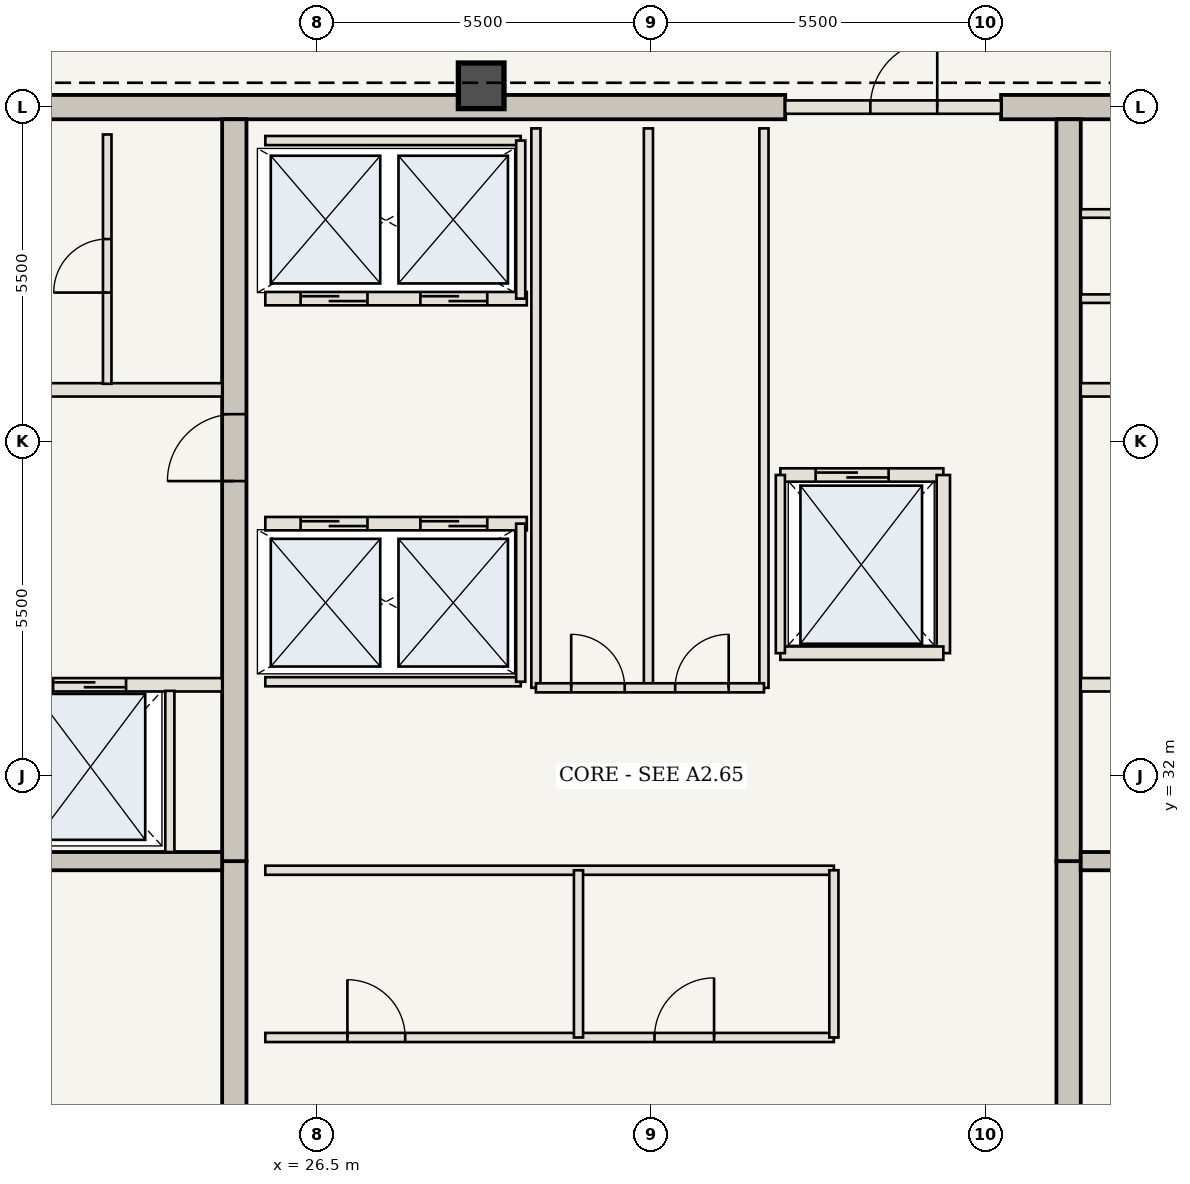
"""IFC4 building model, lengths in metres.
Left out: names, types, materials, properties, quantities, classifications, styles, units other than length and angle.
Written with IfcOpenShell. Run it as: python <this file> out.ifc"""

import sys

from ifc_helpers import new_model, si_unit, direction, frame, frame_2d, origin, origin_2d, place, context, subcontext, project, spatial, rectangle, extrude, element, fill, save


model = new_model("IFC4")
c1 = context("Model", 3, precision=1e-05, world=origin(), true_north=direction((0.0, 1.0)))
c2 = subcontext(c1, "Body", "Model", "MODEL_VIEW")
j1 = project(units=[si_unit("LENGTHUNIT", "METRE"), si_unit("PLANEANGLEUNIT", "RADIAN")], contexts=[c1])
p1 = place(None, origin())
s1 = spatial("IfcSite", under=j1, at=p1, CompositionType="ELEMENT")
p2 = place(p1, origin())
s2 = spatial("IfcBuilding", under=s1, at=p2, CompositionType="ELEMENT")
p3 = place(p2, frame((0.0, 0.0, 300.65)))
s3 = spatial("IfcBuildingStorey", under=s2, at=p3, CompositionType="ELEMENT", Elevation=300.65)
p4 = place(p3, frame((21.41, 43.0, 0.0), z_axis=(0.0, 0.0, 1.0), x_axis=(1.0, 0.0, 0.0)))
e1 = element("IfcWall", 1, at=p4, inside=s3, PredefinedType="SHEAR", context=c2, shape_type="SweptSolid", body=[
    extrude(rectangle(XDim=12.79, YDim=0.4, at=frame_2d((6.395, 0.0))), origin(), (0.0, 0.0, 1.0), 3.85),
])
p5 = place(p3, frame((37.75, 43.0, 0.0), z_axis=(0.0, 0.0, 1.0), x_axis=(1.0, 0.0, 0.0)))
e2 = element("IfcWall", 2, at=p5, inside=s3, PredefinedType="SHEAR", context=c2, shape_type="SweptSolid", body=[
    extrude(rectangle(XDim=4.84, YDim=0.4, at=frame_2d((2.42, 0.0))), origin(), (0.0, 0.0, 1.0), 3.85),
])
p6 = place(p3, frame((25.14, 21.15, 0.0), z_axis=(0.0, 0.0, 1.0), x_axis=(0.0, 1.0, 0.0)))
e3 = element("IfcWall", 3, at=p6, inside=s3, PredefinedType="SHEAR", context=c2, shape_type="SweptSolid", body=[
    extrude(rectangle(XDim=9.45, YDim=0.4, at=frame_2d((4.725, 0.0))), origin(), (0.0, 0.0, 1.0), 3.85),
])
p7 = place(p3, frame((25.14, 30.6, 0.0), z_axis=(0.0, 0.0, 1.0), x_axis=(0.0, 1.0, 0.0)))
e4 = element("IfcWall", 4, at=p7, inside=s3, PredefinedType="SHEAR", context=c2, shape_type="SweptSolid", body=[
    extrude(rectangle(XDim=12.2, YDim=0.4, at=frame_2d((6.1, 0.0))), origin(), (0.0, 0.0, 1.0), 3.85),
])
p8 = place(p7, frame((6.25, 0.0, 0.0)))
e5 = element("IfcOpeningElement", 5, at=p8, cuts=e4, PredefinedType="OPENING", context=c2, shape_type="SweptSolid", body=[
    extrude(rectangle(XDim=1.1, YDim=2.15, at=frame_2d((0.55, 1.075))), frame((0.0, 0.21, 0.0), z_axis=(0.0, -1.0, 0.0), x_axis=(1.0, 0.0, 0.0)), (0.0, 0.0, 1.0), 0.42),
])
p9 = place(p3, frame((38.86, 21.15, 0.0), z_axis=(0.0, 0.0, 1.0), x_axis=(0.0, 1.0, 0.0)))
e6 = element("IfcWall", 6, at=p9, inside=s3, PredefinedType="SHEAR", context=c2, shape_type="SweptSolid", body=[
    extrude(rectangle(XDim=9.45, YDim=0.4, at=frame_2d((4.725, 0.0))), origin(), (0.0, 0.0, 1.0), 3.85),
])
p10 = place(p3, frame((38.86, 30.6, 0.0), z_axis=(0.0, 0.0, 1.0), x_axis=(0.0, 1.0, 0.0)))
e7 = element("IfcWall", 7, at=p10, inside=s3, PredefinedType="SHEAR", context=c2, shape_type="SweptSolid", body=[
    extrude(rectangle(XDim=12.2, YDim=0.4, at=frame_2d((6.1, 0.0))), origin(), (0.0, 0.0, 1.0), 3.85),
])
p11 = place(p3, frame((29.2, 43.35, 0.0), z_axis=(0.0, 0.0, 1.0), x_axis=(1.0, 0.0, 0.0)))
e8 = element("IfcColumn", 8, at=p11, inside=s3, PredefinedType="COLUMN", context=c2, shape_type="SweptSolid", body=[
    extrude(rectangle(XDim=0.75, YDim=0.75, at=origin_2d()), origin(), (0.0, 0.0, 1.0), 3.85),
])
for number, where, z_axis, x_axis in (
    (9, (21.41, 30.6, 0.0), (0.0, 0.0, 1.0), (1.0, 0.0, 0.0)),
    (10, (39.06, 30.6, 0.0), (0.0, 0.0, 1.0), (1.0, 0.0, 0.0)),
):
    element("IfcWall", number, at=place(p3, frame(where, z_axis=z_axis, x_axis=x_axis)), inside=s3, PredefinedType="SHEAR", context=c2, shape_type="SweptSolid", body=[
        extrude(rectangle(XDim=3.53, YDim=0.3, at=frame_2d((1.765, 0.0))), origin(), (0.0, 0.0, 1.0), 3.685),
    ])
p12 = place(p3, frame((21.41, 33.5, 0.0), z_axis=(0.0, 0.0, 1.0), x_axis=(1.0, 0.0, 0.0)))
e11 = element("IfcWall", 11, at=p12, inside=s3, PredefinedType="STANDARD", context=c2, shape_type="SweptSolid", body=[
    extrude(rectangle(XDim=3.53, YDim=0.22, at=frame_2d((1.765, 0.0))), origin(), (0.0, 0.0, 1.0), 3.685),
])
p13 = place(p12, frame((0.75, 0.0, 0.0)))
e12 = element("IfcOpeningElement", 12, at=p13, cuts=e11, PredefinedType="OPENING", context=c2, shape_type="SweptSolid", body=[
    extrude(rectangle(XDim=1.2, YDim=2.2, at=frame_2d((0.6, 1.1))), frame((0.0, 0.12, 0.0), z_axis=(0.0, -1.0, 0.0), x_axis=(1.0, 0.0, 0.0)), (0.0, 0.0, 1.0), 0.24),
])
p14 = place(p3, frame((24.08, 30.75, 0.0), z_axis=(0.0, 0.0, 1.0), x_axis=(0.0, 1.0, 0.0)))
e13 = element("IfcWall", 13, at=p14, inside=s3, PredefinedType="STANDARD", context=c2, shape_type="SweptSolid", body=[
    extrude(rectangle(XDim=2.65, YDim=0.15, at=frame_2d((1.325, 0.0))), origin(), (0.0, 0.0, 1.0), 3.685),
])
p15 = place(p3, frame((39.06, 33.5, 0.0), z_axis=(0.0, 0.0, 1.0), x_axis=(1.0, 0.0, 0.0)))
e14 = element("IfcWall", 14, at=p15, inside=s3, PredefinedType="STANDARD", context=c2, shape_type="SweptSolid", body=[
    extrude(rectangle(XDim=3.53, YDim=0.22, at=frame_2d((1.765, 0.0))), origin(), (0.0, 0.0, 1.0), 3.685),
])
p16 = place(p15, frame((1.55, 0.0, 0.0)))
e15 = element("IfcOpeningElement", 15, at=p16, cuts=e14, PredefinedType="OPENING", context=c2, shape_type="SweptSolid", body=[
    extrude(rectangle(XDim=1.2, YDim=2.2, at=frame_2d((0.6, 1.1))), frame((0.0, 0.12, 0.0), z_axis=(0.0, -1.0, 0.0), x_axis=(1.0, 0.0, 0.0)), (0.0, 0.0, 1.0), 0.24),
])
for number, where, z_axis, x_axis in (
    (16, (21.41, 38.35, 0.0), (0.0, 0.0, 1.0), (1.0, 0.0, 0.0)),
    (17, (39.06, 38.35, 0.0), (0.0, 0.0, 1.0), (1.0, 0.0, 0.0)),
):
    element("IfcWall", number, at=place(p3, frame(where, z_axis=z_axis, x_axis=x_axis)), inside=s3, PredefinedType="STANDARD", context=c2, shape_type="SweptSolid", body=[
        extrude(rectangle(XDim=3.53, YDim=0.22, at=frame_2d((1.765, 0.0))), origin(), (0.0, 0.0, 1.0), 3.685),
    ])
p17 = place(p3, frame((23.05, 38.45, 0.0), z_axis=(0.0, 0.0, 1.0), x_axis=(0.0, 1.0, 0.0)))
e18 = element("IfcWall", 18, at=p17, inside=s3, PredefinedType="STANDARD", context=c2, shape_type="SweptSolid", body=[
    extrude(rectangle(XDim=4.1, YDim=0.14, at=frame_2d((2.05, 0.0))), origin(), (0.0, 0.0, 1.0), 3.685),
])
p18 = place(p17, frame((1.5, 0.0, 0.0)))
e19 = element("IfcOpeningElement", 19, at=p18, cuts=e18, PredefinedType="OPENING", context=c2, shape_type="SweptSolid", body=[
    extrude(rectangle(XDim=0.88, YDim=2.1, at=frame_2d((0.44, 1.05))), frame((0.0, 0.08, 0.0), z_axis=(0.0, -1.0, 0.0), x_axis=(1.0, 0.0, 0.0)), (0.0, 0.0, 1.0), 0.16),
])
for number, where, z_axis, x_axis in (
    (20, (39.06, 39.85, 0.0), (0.0, 0.0, 1.0), (1.0, 0.0, 0.0)),
    (21, (39.06, 41.25, 0.0), (0.0, 0.0, 1.0), (1.0, 0.0, 0.0)),
):
    element("IfcWall", number, at=place(p3, frame(where, z_axis=z_axis, x_axis=x_axis)), inside=s3, PredefinedType="STANDARD", context=c2, shape_type="SweptSolid", body=[
        extrude(rectangle(XDim=3.53, YDim=0.14, at=frame_2d((1.765, 0.0))), origin(), (0.0, 0.0, 1.0), 3.685),
    ])
p19 = place(p3, frame((25.65, 27.7, 0.0), z_axis=(0.0, 0.0, 1.0), x_axis=(1.0, 0.0, 0.0)))
e22 = element("IfcWall", 22, at=p19, inside=s3, PredefinedType="STANDARD", context=c2, shape_type="SweptSolid", body=[
    extrude(rectangle(XDim=9.35, YDim=0.15, at=frame_2d((4.675, 0.0))), origin(), (0.0, 0.0, 1.0), 3.685),
])
p20 = place(p19, frame((1.35, 0.0, 0.0)))
e23 = element("IfcOpeningElement", 23, at=p20, cuts=e22, PredefinedType="OPENING", context=c2, shape_type="SweptSolid", body=[
    extrude(rectangle(XDim=0.95, YDim=2.15, at=frame_2d((0.475, 1.075))), frame((0.0, 0.085, 0.0), z_axis=(0.0, -1.0, 0.0), x_axis=(1.0, 0.0, 0.0)), (0.0, 0.0, 1.0), 0.17),
])
p21 = place(p19, frame((6.4, 0.0, 0.0)))
e24 = element("IfcOpeningElement", 24, at=p21, cuts=e22, PredefinedType="OPENING", context=c2, shape_type="SweptSolid", body=[
    extrude(rectangle(XDim=0.98, YDim=2.2, at=frame_2d((0.49, 1.1))), frame((0.0, 0.085, 0.0), z_axis=(0.0, -1.0, 0.0), x_axis=(1.0, 0.0, 0.0)), (0.0, 0.0, 1.0), 0.17),
])
p22 = place(p3, frame((25.65, 30.45, 0.0), z_axis=(0.0, 0.0, 1.0), x_axis=(1.0, 0.0, 0.0)))
e25 = element("IfcWall", 25, at=p22, inside=s3, PredefinedType="STANDARD", context=c2, shape_type="SweptSolid", body=[
    extrude(rectangle(XDim=9.35, YDim=0.15, at=frame_2d((4.675, 0.0))), origin(), (0.0, 0.0, 1.0), 3.685),
])
for number, where, z_axis, x_axis in (
    (26, (30.8, 27.7, 0.0), (0.0, 0.0, 1.0), (0.0, 1.0, 0.0)),
    (27, (35.0, 27.7, 0.0), (0.0, 0.0, 1.0), (0.0, 1.0, 0.0)),
):
    element("IfcWall", number, at=place(p3, frame(where, z_axis=z_axis, x_axis=x_axis)), inside=s3, PredefinedType="STANDARD", context=c2, shape_type="SweptSolid", body=[
        extrude(rectangle(XDim=2.75, YDim=0.15, at=frame_2d((1.375, 0.0))), origin(), (0.0, 0.0, 1.0), 3.685),
    ])
p23 = place(p3, frame((25.65, 36.15, 0.0), z_axis=(0.0, 0.0, 1.0), x_axis=(1.0, 0.0, 0.0)))
e28 = element("IfcWall", 28, at=p23, inside=s3, PredefinedType="STANDARD", context=c2, shape_type="SweptSolid", body=[
    extrude(rectangle(XDim=4.3, YDim=0.22, at=frame_2d((2.15, 0.0))), origin(), (0.0, 0.0, 1.0), 3.685),
])
p24 = place(p23, frame((0.58, 0.0, 0.0)))
e29 = element("IfcOpeningElement", 29, at=p24, cuts=e28, PredefinedType="OPENING", context=c2, shape_type="SweptSolid", body=[
    extrude(rectangle(XDim=1.1, YDim=2.15, at=frame_2d((0.55, 1.075))), frame((0.0, 0.12, 0.0), z_axis=(0.0, -1.0, 0.0), x_axis=(1.0, 0.0, 0.0)), (0.0, 0.0, 1.0), 0.24),
])
p25 = place(p23, frame((2.55, 0.0, 0.0)))
e30 = element("IfcOpeningElement", 30, at=p25, cuts=e28, PredefinedType="OPENING", context=c2, shape_type="SweptSolid", body=[
    extrude(rectangle(XDim=1.1, YDim=2.15, at=frame_2d((0.55, 1.075))), frame((0.0, 0.12, 0.0), z_axis=(0.0, -1.0, 0.0), x_axis=(1.0, 0.0, 0.0)), (0.0, 0.0, 1.0), 0.24),
])
p26 = place(p3, frame((25.65, 33.55, 0.0), z_axis=(0.0, 0.0, 1.0), x_axis=(1.0, 0.0, 0.0)))
e31 = element("IfcWall", 31, at=p26, inside=s3, PredefinedType="STANDARD", context=c2, shape_type="SweptSolid", body=[
    extrude(rectangle(XDim=4.2, YDim=0.15, at=frame_2d((2.1, 0.0))), origin(), (0.0, 0.0, 1.0), 3.685),
])
p27 = place(p3, frame((29.85, 33.55, 0.0), z_axis=(0.0, 0.0, 1.0), x_axis=(0.0, 1.0, 0.0)))
e32 = element("IfcWall", 32, at=p27, inside=s3, PredefinedType="STANDARD", context=c2, shape_type="SweptSolid", body=[
    extrude(rectangle(XDim=2.6, YDim=0.15, at=frame_2d((1.3, 0.0))), origin(), (0.0, 0.0, 1.0), 3.685),
])
p28 = place(p3, frame((25.65, 39.85, 0.0), z_axis=(0.0, 0.0, 1.0), x_axis=(1.0, 0.0, 0.0)))
e33 = element("IfcWall", 33, at=p28, inside=s3, PredefinedType="STANDARD", context=c2, shape_type="SweptSolid", body=[
    extrude(rectangle(XDim=4.3, YDim=0.22, at=frame_2d((2.15, 0.0))), origin(), (0.0, 0.0, 1.0), 3.685),
])
p29 = place(p28, frame((0.58, 0.0, 0.0)))
e34 = element("IfcOpeningElement", 34, at=p29, cuts=e33, PredefinedType="OPENING", context=c2, shape_type="SweptSolid", body=[
    extrude(rectangle(XDim=1.1, YDim=2.15, at=frame_2d((0.55, 1.075))), frame((0.0, 0.12, 0.0), z_axis=(0.0, -1.0, 0.0), x_axis=(1.0, 0.0, 0.0)), (0.0, 0.0, 1.0), 0.24),
])
p30 = place(p28, frame((2.55, 0.0, 0.0)))
e35 = element("IfcOpeningElement", 35, at=p30, cuts=e33, PredefinedType="OPENING", context=c2, shape_type="SweptSolid", body=[
    extrude(rectangle(XDim=1.1, YDim=2.15, at=frame_2d((0.55, 1.075))), frame((0.0, 0.12, 0.0), z_axis=(0.0, -1.0, 0.0), x_axis=(1.0, 0.0, 0.0)), (0.0, 0.0, 1.0), 0.24),
])
p31 = place(p3, frame((25.65, 42.45, 0.0), z_axis=(0.0, 0.0, 1.0), x_axis=(1.0, 0.0, 0.0)))
e36 = element("IfcWall", 36, at=p31, inside=s3, PredefinedType="STANDARD", context=c2, shape_type="SweptSolid", body=[
    extrude(rectangle(XDim=4.2, YDim=0.15, at=frame_2d((2.1, 0.0))), origin(), (0.0, 0.0, 1.0), 3.685),
])
p32 = place(p3, frame((29.85, 39.85, 0.0), z_axis=(0.0, 0.0, 1.0), x_axis=(0.0, 1.0, 0.0)))
e37 = element("IfcWall", 37, at=p32, inside=s3, PredefinedType="STANDARD", context=c2, shape_type="SweptSolid", body=[
    extrude(rectangle(XDim=2.6, YDim=0.15, at=frame_2d((1.3, 0.0))), origin(), (0.0, 0.0, 1.0), 3.685),
])
for number, where, z_axis, x_axis in (
    (38, (30.1, 33.45, 0.0), (0.0, 0.0, 1.0), (0.0, 1.0, 0.0)),
    (39, (31.95, 33.45, 0.0), (0.0, 0.0, 1.0), (0.0, 1.0, 0.0)),
    (40, (33.85, 33.45, 0.0), (0.0, 0.0, 1.0), (0.0, 1.0, 0.0)),
):
    element("IfcWall", number, at=place(p3, frame(where, z_axis=z_axis, x_axis=x_axis)), inside=s3, PredefinedType="STANDARD", context=c2, shape_type="SweptSolid", body=[
        extrude(rectangle(XDim=9.2, YDim=0.15, at=frame_2d((4.6, 0.0))), origin(), (0.0, 0.0, 1.0), 3.685),
    ])
p33 = place(p3, frame((30.1, 33.45, 0.0), z_axis=(0.0, 0.0, 1.0), x_axis=(1.0, 0.0, 0.0)))
e41 = element("IfcWall", 41, at=p33, inside=s3, PredefinedType="STANDARD", context=c2, shape_type="SweptSolid", body=[
    extrude(rectangle(XDim=3.75, YDim=0.15, at=frame_2d((1.875, 0.0))), origin(), (0.0, 0.0, 1.0), 3.685),
])
p34 = place(p33, frame((0.58, 0.0, 0.0)))
e42 = element("IfcOpeningElement", 42, at=p34, cuts=e41, PredefinedType="OPENING", context=c2, shape_type="SweptSolid", body=[
    extrude(rectangle(XDim=0.88, YDim=2.1, at=frame_2d((0.44, 1.05))), frame((0.0, 0.085, 0.0), z_axis=(0.0, -1.0, 0.0), x_axis=(1.0, 0.0, 0.0)), (0.0, 0.0, 1.0), 0.17),
])
p35 = place(p33, frame((2.29, 0.0, 0.0)))
e43 = element("IfcOpeningElement", 43, at=p35, cuts=e41, PredefinedType="OPENING", context=c2, shape_type="SweptSolid", body=[
    extrude(rectangle(XDim=0.88, YDim=2.1, at=frame_2d((0.44, 1.05))), frame((0.0, 0.085, 0.0), z_axis=(0.0, -1.0, 0.0), x_axis=(1.0, 0.0, 0.0)), (0.0, 0.0, 1.0), 0.17),
])
p36 = place(p3, frame((34.2, 43.0, 0.0), z_axis=(0.0, 0.0, 1.0), x_axis=(1.0, 0.0, 0.0)))
e44 = element("IfcWall", 44, at=p36, inside=s3, PredefinedType="STANDARD", context=c2, shape_type="SweptSolid", body=[
    extrude(rectangle(XDim=3.55, YDim=0.22, at=frame_2d((1.775, 0.0))), origin(), (0.0, 0.0, 1.0), 3.685),
])
p37 = place(p36, frame((1.4, 0.0, 0.0)))
e45 = element("IfcOpeningElement", 45, at=p37, cuts=e44, PredefinedType="OPENING", context=c2, shape_type="SweptSolid", body=[
    extrude(rectangle(XDim=1.1, YDim=2.15, at=frame_2d((0.55, 1.075))), frame((0.0, 0.12, 0.0), z_axis=(0.0, -1.0, 0.0), x_axis=(1.0, 0.0, 0.0)), (0.0, 0.0, 1.0), 0.24),
])
p38 = place(p3, frame((34.12, 36.95, 0.0), z_axis=(0.0, 0.0, 1.0), x_axis=(1.0, 0.0, 0.0)))
e46 = element("IfcWall", 46, at=p38, inside=s3, PredefinedType="STANDARD", context=c2, shape_type="SweptSolid", body=[
    extrude(rectangle(XDim=2.68, YDim=0.22, at=frame_2d((1.34, 0.0))), origin(), (0.0, 0.0, 1.0), 3.685),
])
p39 = place(p38, frame((0.58, 0.0, 0.0)))
e47 = element("IfcOpeningElement", 47, at=p39, cuts=e46, PredefinedType="OPENING", context=c2, shape_type="SweptSolid", body=[
    extrude(rectangle(XDim=1.2, YDim=2.2, at=frame_2d((0.6, 1.1))), frame((0.0, 0.12, 0.0), z_axis=(0.0, -1.0, 0.0), x_axis=(1.0, 0.0, 0.0)), (0.0, 0.0, 1.0), 0.24),
])
p40 = place(p3, frame((36.8, 34.02, 0.0), z_axis=(0.0, 0.0, 1.0), x_axis=(0.0, 1.0, 0.0)))
e48 = element("IfcWall", 48, at=p40, inside=s3, PredefinedType="STANDARD", context=c2, shape_type="SweptSolid", body=[
    extrude(rectangle(XDim=2.93, YDim=0.22, at=frame_2d((1.465, 0.0))), origin(), (0.0, 0.0, 1.0), 3.685),
])
p41 = place(p3, frame((34.12, 34.02, 0.0), z_axis=(0.0, 0.0, 1.0), x_axis=(1.0, 0.0, 0.0)))
e49 = element("IfcWall", 49, at=p41, inside=s3, PredefinedType="STANDARD", context=c2, shape_type="SweptSolid", body=[
    extrude(rectangle(XDim=2.68, YDim=0.22, at=frame_2d((1.34, 0.0))), origin(), (0.0, 0.0, 1.0), 3.685),
])
p42 = place(p3, frame((34.12, 34.02, 0.0), z_axis=(0.0, 0.0, 1.0), x_axis=(0.0, 1.0, 0.0)))
e50 = element("IfcWall", 50, at=p42, inside=s3, PredefinedType="STANDARD", context=c2, shape_type="SweptSolid", body=[
    extrude(rectangle(XDim=2.93, YDim=0.15, at=frame_2d((1.465, 0.0))), origin(), (0.0, 0.0, 1.0), 3.685),
])
p43 = place(p8, origin())
e51 = element("IfcDoor", 51, at=p43, inside=s3, OperationType="SINGLE_SWING_LEFT", PredefinedType="DOOR", context=c2, shape_type="SweptSolid", body=[
    extrude(rectangle(XDim=1.1, YDim=2.15, at=frame_2d((0.55, 1.075))), frame((0.0, 0.025, 0.0), z_axis=(0.0, -1.0, 0.0), x_axis=(1.0, 0.0, 0.0)), (0.0, 0.0, 1.0), 0.05),
])
fill(e5, e51)
p44 = place(p13, origin())
e52 = element("IfcDoor", 52, at=p44, inside=s3, OperationType="DOUBLE_DOOR_SLIDING", PredefinedType="DOOR", context=c2, shape_type="SweptSolid", body=[
    extrude(rectangle(XDim=1.2, YDim=2.2, at=frame_2d((0.6, 1.1))), frame((0.0, 0.025, 0.0), z_axis=(0.0, -1.0, 0.0), x_axis=(1.0, 0.0, 0.0)), (0.0, 0.0, 1.0), 0.05),
])
fill(e12, e52)
p45 = place(p18, origin())
e53 = element("IfcDoor", 53, at=p45, inside=s3, OperationType="SINGLE_SWING_LEFT", PredefinedType="DOOR", context=c2, shape_type="SweptSolid", body=[
    extrude(rectangle(XDim=0.88, YDim=2.1, at=frame_2d((0.44, 1.05))), frame((0.0, 0.025, 0.0), z_axis=(0.0, -1.0, 0.0), x_axis=(1.0, 0.0, 0.0)), (0.0, 0.0, 1.0), 0.05),
])
fill(e19, e53)
p46 = place(p20, origin())
e54 = element("IfcDoor", 54, at=p46, inside=s3, OperationType="SINGLE_SWING_LEFT", PredefinedType="DOOR", context=c2, shape_type="SweptSolid", body=[
    extrude(rectangle(XDim=0.95, YDim=2.15, at=frame_2d((0.475, 1.075))), frame((0.0, 0.025, 0.0), z_axis=(0.0, -1.0, 0.0), x_axis=(1.0, 0.0, 0.0)), (0.0, 0.0, 1.0), 0.05),
])
fill(e23, e54)
p47 = place(p21, origin())
e55 = element("IfcDoor", 55, at=p47, inside=s3, OperationType="SINGLE_SWING_RIGHT", PredefinedType="DOOR", context=c2, shape_type="SweptSolid", body=[
    extrude(rectangle(XDim=0.98, YDim=2.2, at=frame_2d((0.49, 1.1))), frame((0.0, 0.025, 0.0), z_axis=(0.0, -1.0, 0.0), x_axis=(1.0, 0.0, 0.0)), (0.0, 0.0, 1.0), 0.05),
])
fill(e24, e55)
p48 = place(p24, origin())
e56 = element("IfcDoor", 56, at=p48, inside=s3, OperationType="DOUBLE_DOOR_SLIDING", PredefinedType="DOOR", context=c2, shape_type="SweptSolid", body=[
    extrude(rectangle(XDim=1.1, YDim=2.15, at=frame_2d((0.55, 1.075))), frame((0.0, 0.025, 0.0), z_axis=(0.0, -1.0, 0.0), x_axis=(1.0, 0.0, 0.0)), (0.0, 0.0, 1.0), 0.05),
])
fill(e29, e56)
p49 = place(p25, origin())
e57 = element("IfcDoor", 57, at=p49, inside=s3, OperationType="DOUBLE_DOOR_SLIDING", PredefinedType="DOOR", context=c2, shape_type="SweptSolid", body=[
    extrude(rectangle(XDim=1.1, YDim=2.15, at=frame_2d((0.55, 1.075))), frame((0.0, 0.025, 0.0), z_axis=(0.0, -1.0, 0.0), x_axis=(1.0, 0.0, 0.0)), (0.0, 0.0, 1.0), 0.05),
])
fill(e30, e57)
p50 = place(p29, origin())
e58 = element("IfcDoor", 58, at=p50, inside=s3, OperationType="DOUBLE_DOOR_SLIDING", PredefinedType="DOOR", context=c2, shape_type="SweptSolid", body=[
    extrude(rectangle(XDim=1.1, YDim=2.15, at=frame_2d((0.55, 1.075))), frame((0.0, 0.025, 0.0), z_axis=(0.0, -1.0, 0.0), x_axis=(1.0, 0.0, 0.0)), (0.0, 0.0, 1.0), 0.05),
])
fill(e34, e58)
p51 = place(p30, origin())
e59 = element("IfcDoor", 59, at=p51, inside=s3, OperationType="DOUBLE_DOOR_SLIDING", PredefinedType="DOOR", context=c2, shape_type="SweptSolid", body=[
    extrude(rectangle(XDim=1.1, YDim=2.15, at=frame_2d((0.55, 1.075))), frame((0.0, 0.025, 0.0), z_axis=(0.0, -1.0, 0.0), x_axis=(1.0, 0.0, 0.0)), (0.0, 0.0, 1.0), 0.05),
])
fill(e35, e59)
p52 = place(p34, origin())
e60 = element("IfcDoor", 60, at=p52, inside=s3, OperationType="SINGLE_SWING_LEFT", PredefinedType="DOOR", context=c2, shape_type="SweptSolid", body=[
    extrude(rectangle(XDim=0.88, YDim=2.1, at=frame_2d((0.44, 1.05))), frame((0.0, 0.025, 0.0), z_axis=(0.0, -1.0, 0.0), x_axis=(1.0, 0.0, 0.0)), (0.0, 0.0, 1.0), 0.05),
])
fill(e42, e60)
p53 = place(p35, origin())
e61 = element("IfcDoor", 61, at=p53, inside=s3, OperationType="SINGLE_SWING_RIGHT", PredefinedType="DOOR", context=c2, shape_type="SweptSolid", body=[
    extrude(rectangle(XDim=0.88, YDim=2.1, at=frame_2d((0.44, 1.05))), frame((0.0, 0.025, 0.0), z_axis=(0.0, -1.0, 0.0), x_axis=(1.0, 0.0, 0.0)), (0.0, 0.0, 1.0), 0.05),
])
fill(e43, e61)
p54 = place(p37, origin())
e62 = element("IfcDoor", 62, at=p54, inside=s3, OperationType="SINGLE_SWING_RIGHT", PredefinedType="DOOR", context=c2, shape_type="SweptSolid", body=[
    extrude(rectangle(XDim=1.1, YDim=2.15, at=frame_2d((0.55, 1.075))), frame((0.0, 0.025, 0.0), z_axis=(0.0, -1.0, 0.0), x_axis=(1.0, 0.0, 0.0)), (0.0, 0.0, 1.0), 0.05),
])
fill(e45, e62)
p55 = place(p39, origin())
e63 = element("IfcDoor", 63, at=p55, inside=s3, OperationType="DOUBLE_DOOR_SLIDING", PredefinedType="DOOR", context=c2, shape_type="SweptSolid", body=[
    extrude(rectangle(XDim=1.2, YDim=2.2, at=frame_2d((0.6, 1.1))), frame((0.0, 0.025, 0.0), z_axis=(0.0, -1.0, 0.0), x_axis=(1.0, 0.0, 0.0)), (0.0, 0.0, 1.0), 0.05),
])
fill(e47, e63)
save(model, sys.argv[1])
